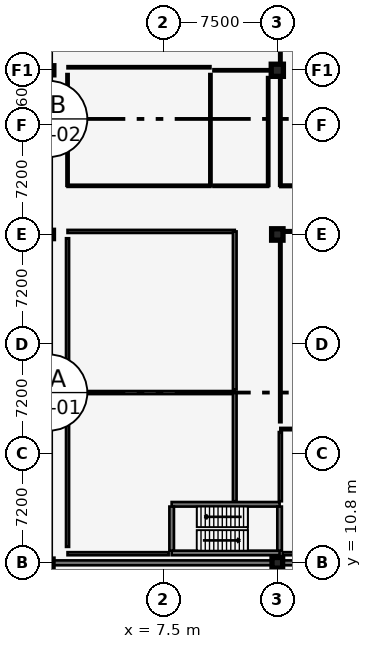
"""IFC4 building model, lengths in metres.
Left out: names, types, materials, properties, quantities, classifications, styles, units other than length and angle.
Written with IfcOpenShell. Run it as: python <this file> out.ifc"""

import sys

from ifc_helpers import new_model, si_unit, direction, frame, frame_2d, origin, origin_2d, place, context, subcontext, project, spatial, rectangle, extrude, element, fill, save


model = new_model("IFC4")
c1 = context("Model", 3, precision=1e-05, world=origin(), true_north=direction((0.0, 1.0)))
c2 = subcontext(c1, "Body", "Model", "MODEL_VIEW")
j1 = project(units=[si_unit("LENGTHUNIT", "METRE"), si_unit("PLANEANGLEUNIT", "RADIAN")], contexts=[c1])
p1 = place(None, origin())
s1 = spatial("IfcSite", under=j1, at=p1, CompositionType="ELEMENT")
p2 = place(p1, origin())
s2 = spatial("IfcBuilding", under=s1, at=p2, CompositionType="ELEMENT")
p3 = place(p2, origin())
s3 = spatial("IfcBuildingStorey", under=s2, at=p3, CompositionType="ELEMENT", Elevation=0.0)
p4 = place(p3, frame((0.0, 10.8, 0.0), z_axis=(0.0, 0.0, 1.0), x_axis=(1.0, 0.0, 0.0)))
e1 = element("IfcColumn", 1, at=p4, inside=s3, PredefinedType="COLUMN", context=c2, shape_type="SweptSolid", body=[
    extrude(rectangle(XDim=0.5, YDim=0.5, at=origin_2d()), origin(), (0.0, 0.0, 1.0), 4.8),
])
p5 = place(p3, frame((0.0, 32.4, 0.0), z_axis=(0.0, 0.0, 1.0), x_axis=(1.0, 0.0, 0.0)))
e2 = element("IfcColumn", 2, at=p5, inside=s3, PredefinedType="COLUMN", context=c2, shape_type="SweptSolid", body=[
    extrude(rectangle(XDim=0.55, YDim=0.55, at=origin_2d()), origin(), (0.0, 0.0, 1.0), 4.8),
])
p6 = place(p3, frame((0.0, 43.2, 0.0), z_axis=(0.0, 0.0, 1.0), x_axis=(1.0, 0.0, 0.0)))
e3 = element("IfcColumn", 3, at=p6, inside=s3, PredefinedType="COLUMN", context=c2, shape_type="SweptSolid", body=[
    extrude(rectangle(XDim=0.6, YDim=0.6, at=origin_2d()), origin(), (0.0, 0.0, 1.0), 4.8),
])
p7 = place(p3, frame((15.0, 10.8, 0.0), z_axis=(0.0, 0.0, 1.0), x_axis=(1.0, 0.0, 0.0)))
e4 = element("IfcColumn", 4, at=p7, inside=s3, PredefinedType="COLUMN", context=c2, shape_type="SweptSolid", body=[
    extrude(rectangle(XDim=0.7, YDim=0.7, at=origin_2d()), origin(), (0.0, 0.0, 1.0), 4.8),
])
p8 = place(p3, frame((15.0, 32.4, 0.0), z_axis=(0.0, 0.0, 1.0), x_axis=(1.0, 0.0, 0.0)))
e5 = element("IfcColumn", 5, at=p8, inside=s3, PredefinedType="COLUMN", context=c2, shape_type="SweptSolid", body=[
    extrude(rectangle(XDim=0.75, YDim=0.75, at=origin_2d()), origin(), (0.0, 0.0, 1.0), 4.8),
])
p9 = place(p3, frame((15.0, 43.2, 0.0), z_axis=(0.0, 0.0, 1.0), x_axis=(1.0, 0.0, 0.0)))
e6 = element("IfcColumn", 6, at=p9, inside=s3, PredefinedType="COLUMN", context=c2, shape_type="SweptSolid", body=[
    extrude(rectangle(XDim=0.8, YDim=0.8, at=origin_2d()), origin(), (0.0, 0.0, 1.0), 4.8),
])
p10 = place(p3, frame((0.0, 10.8, 0.0), z_axis=(0.0, 0.0, 1.0), x_axis=(1.0, 0.0, 0.0)))
e7 = element("IfcWall", 7, at=p10, inside=s3, PredefinedType="SOLIDWALL", context=c2, shape_type="SweptSolid", body=[
    extrude(rectangle(XDim=93.6, YDim=0.32, at=frame_2d((46.8, 0.0))), origin(), (0.0, 0.0, 1.0), 4.25),
])
p11 = place(p10, frame((2.2, 0.0, 0.72)))
e8 = element("IfcOpeningElement", 8, at=p11, cuts=e7, PredefinedType="OPENING", context=c2, shape_type="SweptSolid", body=[
    extrude(rectangle(XDim=1.35, YDim=2.05, at=frame_2d((0.675, 1.025))), frame((0.0, 0.17, 0.0), z_axis=(0.0, -1.0, 0.0), x_axis=(1.0, 0.0, 0.0)), (0.0, 0.0, 1.0), 0.34),
])
p12 = place(p10, frame((9.4, 0.0, 0.72)))
e9 = element("IfcOpeningElement", 9, at=p12, cuts=e7, PredefinedType="OPENING", context=c2, shape_type="SweptSolid", body=[
    extrude(rectangle(XDim=1.5, YDim=2.1, at=frame_2d((0.75, 1.05))), frame((0.0, 0.17, 0.0), z_axis=(0.0, -1.0, 0.0), x_axis=(1.0, 0.0, 0.0)), (0.0, 0.0, 1.0), 0.34),
])
p13 = place(p10, frame((16.6, 0.0, 0.72)))
e10 = element("IfcOpeningElement", 10, at=p13, cuts=e7, PredefinedType="OPENING", context=c2, shape_type="SweptSolid", body=[
    extrude(rectangle(XDim=1.65, YDim=2.1, at=frame_2d((0.825, 1.05))), frame((0.0, 0.17, 0.0), z_axis=(0.0, -1.0, 0.0), x_axis=(1.0, 0.0, 0.0)), (0.0, 0.0, 1.0), 0.34),
])
p14 = place(p10, frame((23.8, 0.0, 0.72)))
e11 = element("IfcOpeningElement", 11, at=p14, cuts=e7, PredefinedType="OPENING", context=c2, shape_type="SweptSolid", body=[
    extrude(rectangle(XDim=1.8, YDim=2.15, at=frame_2d((0.9, 1.075))), frame((0.0, 0.17, 0.0), z_axis=(0.0, -1.0, 0.0), x_axis=(1.0, 0.0, 0.0)), (0.0, 0.0, 1.0), 0.34),
])
p15 = place(p10, frame((31.0, 0.0, 0.72)))
e12 = element("IfcOpeningElement", 12, at=p15, cuts=e7, PredefinedType="OPENING", context=c2, shape_type="SweptSolid", body=[
    extrude(rectangle(XDim=1.2, YDim=2.0, at=frame_2d((0.6, 1.0))), frame((0.0, 0.17, 0.0), z_axis=(0.0, -1.0, 0.0), x_axis=(1.0, 0.0, 0.0)), (0.0, 0.0, 1.0), 0.34),
])
p16 = place(p10, frame((38.2, 0.0, 0.72)))
e13 = element("IfcOpeningElement", 13, at=p16, cuts=e7, PredefinedType="OPENING", context=c2, shape_type="SweptSolid", body=[
    extrude(rectangle(XDim=1.35, YDim=2.05, at=frame_2d((0.675, 1.025))), frame((0.0, 0.17, 0.0), z_axis=(0.0, -1.0, 0.0), x_axis=(1.0, 0.0, 0.0)), (0.0, 0.0, 1.0), 0.34),
])
p17 = place(p10, frame((52.6, 0.0, 0.72)))
e14 = element("IfcOpeningElement", 14, at=p17, cuts=e7, PredefinedType="OPENING", context=c2, shape_type="SweptSolid", body=[
    extrude(rectangle(XDim=1.65, YDim=2.1, at=frame_2d((0.825, 1.05))), frame((0.0, 0.17, 0.0), z_axis=(0.0, -1.0, 0.0), x_axis=(1.0, 0.0, 0.0)), (0.0, 0.0, 1.0), 0.34),
])
p18 = place(p10, frame((67.0, 0.0, 0.72)))
e15 = element("IfcOpeningElement", 15, at=p18, cuts=e7, PredefinedType="OPENING", context=c2, shape_type="SweptSolid", body=[
    extrude(rectangle(XDim=1.2, YDim=2.0, at=frame_2d((0.6, 1.0))), frame((0.0, 0.17, 0.0), z_axis=(0.0, -1.0, 0.0), x_axis=(1.0, 0.0, 0.0)), (0.0, 0.0, 1.0), 0.34),
])
p19 = place(p10, frame((81.4, 0.0, 0.72)))
e16 = element("IfcOpeningElement", 16, at=p19, cuts=e7, PredefinedType="OPENING", context=c2, shape_type="SweptSolid", body=[
    extrude(rectangle(XDim=1.5, YDim=2.1, at=frame_2d((0.75, 1.05))), frame((0.0, 0.17, 0.0), z_axis=(0.0, -1.0, 0.0), x_axis=(1.0, 0.0, 0.0)), (0.0, 0.0, 1.0), 0.34),
])
p20 = place(p10, frame((6.2, 0.0, 0.0)))
e17 = element("IfcOpeningElement", 17, at=p20, cuts=e7, PredefinedType="OPENING", context=c2, shape_type="SweptSolid", body=[
    extrude(rectangle(XDim=2.0, YDim=2.35, at=frame_2d((1.0, 1.175))), frame((0.0, 0.17, 0.0), z_axis=(0.0, -1.0, 0.0), x_axis=(1.0, 0.0, 0.0)), (0.0, 0.0, 1.0), 0.34),
])
p21 = place(p10, frame((20.6, 0.0, 0.0)))
e18 = element("IfcOpeningElement", 18, at=p21, cuts=e7, PredefinedType="OPENING", context=c2, shape_type="SweptSolid", body=[
    extrude(rectangle(XDim=1.05, YDim=2.1, at=frame_2d((0.525, 1.05))), frame((0.0, 0.17, 0.0), z_axis=(0.0, -1.0, 0.0), x_axis=(1.0, 0.0, 0.0)), (0.0, 0.0, 1.0), 0.34),
])
p22 = place(p10, frame((35.0, 0.0, 0.0)))
e19 = element("IfcOpeningElement", 19, at=p22, cuts=e7, PredefinedType="OPENING", context=c2, shape_type="SweptSolid", body=[
    extrude(rectangle(XDim=2.0, YDim=2.35, at=frame_2d((1.0, 1.175))), frame((0.0, 0.17, 0.0), z_axis=(0.0, -1.0, 0.0), x_axis=(1.0, 0.0, 0.0)), (0.0, 0.0, 1.0), 0.34),
])
p23 = place(p10, frame((49.4, 0.0, 0.0)))
e20 = element("IfcOpeningElement", 20, at=p23, cuts=e7, PredefinedType="OPENING", context=c2, shape_type="SweptSolid", body=[
    extrude(rectangle(XDim=2.0, YDim=2.35, at=frame_2d((1.0, 1.175))), frame((0.0, 0.17, 0.0), z_axis=(0.0, -1.0, 0.0), x_axis=(1.0, 0.0, 0.0)), (0.0, 0.0, 1.0), 0.34),
])
p24 = place(p10, frame((63.8, 0.0, 0.0)))
e21 = element("IfcOpeningElement", 21, at=p24, cuts=e7, PredefinedType="OPENING", context=c2, shape_type="SweptSolid", body=[
    extrude(rectangle(XDim=1.1, YDim=2.1, at=frame_2d((0.55, 1.05))), frame((0.0, 0.17, 0.0), z_axis=(0.0, -1.0, 0.0), x_axis=(1.0, 0.0, 0.0)), (0.0, 0.0, 1.0), 0.34),
])
for number, where, z_axis, x_axis in (
    (22, (8.05, 11.45, 0.0), (0.0, 0.0, 1.0), (1.0, 0.0, 0.0)),
    (23, (15.15, 14.65, 0.0), (0.0, 0.0, 1.0), (-1.0, 0.0, 0.0)),
):
    element("IfcWall", number, at=place(p3, frame(where, z_axis=z_axis, x_axis=x_axis)), inside=s3, PredefinedType="SHEAR", context=c2, shape_type="SweptSolid", body=[
        extrude(rectangle(XDim=7.1, YDim=0.3, at=frame_2d((3.55, 0.0))), origin(), (0.0, 0.0, 1.0), 4.5),
    ])
p25 = place(p3, frame((15.15, 11.6, 0.0), z_axis=(0.0, 0.0, 1.0), x_axis=(0.0, 1.0, 0.0)))
e24 = element("IfcWall", 24, at=p25, inside=s3, PredefinedType="SHEAR", context=c2, shape_type="SweptSolid", body=[
    extrude(rectangle(XDim=2.9, YDim=0.3, at=frame_2d((1.45, 0.0))), origin(), (0.0, 0.0, 1.0), 4.5),
])
p26 = place(p3, frame((8.05, 14.5, 0.0), z_axis=(0.0, 0.0, 1.0), x_axis=(0.0, -1.0, 0.0)))
e25 = element("IfcWall", 25, at=p26, inside=s3, PredefinedType="SHEAR", context=c2, shape_type="SweptSolid", body=[
    extrude(rectangle(XDim=2.9, YDim=0.3, at=frame_2d((1.45, 0.0))), origin(), (0.0, 0.0, 1.0), 4.5),
])
p27 = place(p26, frame((0.75, 0.0, 0.0)))
e26 = element("IfcOpeningElement", 26, at=p27, cuts=e25, PredefinedType="OPENING", context=c2, shape_type="SweptSolid", body=[
    extrude(rectangle(XDim=1.07, YDim=2.15, at=frame_2d((0.535, 1.075))), frame((0.0, 0.16, 0.0), z_axis=(0.0, -1.0, 0.0), x_axis=(1.0, 0.0, 0.0)), (0.0, 0.0, 1.0), 0.32),
])
p28 = place(p3, frame((55.8, 19.6, 0.0), z_axis=(0.0, 0.0, 1.0), x_axis=(-1.0, 0.0, 0.0)))
e27 = element("IfcWall", 27, at=p28, inside=s3, PredefinedType="PARTITIONING", context=c2, shape_type="SweptSolid", body=[
    extrude(rectangle(XDim=40.6, YDim=0.15, at=frame_2d((20.3, 0.0))), origin(), (0.0, 0.0, 1.0), 3.682),
])
p29 = place(p3, frame((15.2, 32.6, 0.0), z_axis=(0.0, 0.0, 1.0), x_axis=(0.0, -1.0, 0.0)))
e28 = element("IfcWall", 28, at=p29, inside=s3, PredefinedType="PARTITIONING", context=c2, shape_type="SweptSolid", body=[
    extrude(rectangle(XDim=12.55, YDim=0.15, at=frame_2d((6.275, 0.0))), origin(), (0.0, 0.0, 1.0), 4.1),
])
p30 = place(p3, frame((15.2, 32.6, 0.0), z_axis=(0.0, 0.0, 1.0), x_axis=(1.0, 0.0, 0.0)))
e29 = element("IfcWall", 29, at=p30, inside=s3, PredefinedType="PARTITIONING", context=c2, shape_type="SweptSolid", body=[
    extrude(rectangle(XDim=40.6, YDim=0.16, at=frame_2d((20.3, 0.0))), origin(), (0.0, 0.0, 1.0), 3.87),
])
p31 = place(p30, frame((19.3, 0.0, 0.0)))
e30 = element("IfcOpeningElement", 30, at=p31, cuts=e29, PredefinedType="OPENING", context=c2, shape_type="SweptSolid", body=[
    extrude(rectangle(XDim=2.0, YDim=2.3, at=frame_2d((1.0, 1.15))), frame((0.0, 0.09, 0.0), z_axis=(0.0, -1.0, 0.0), x_axis=(1.0, 0.0, 0.0)), (0.0, 0.0, 1.0), 0.18),
])
p32 = place(p30, frame((35.4, 0.0, 0.0)))
e31 = element("IfcOpeningElement", 31, at=p32, cuts=e29, PredefinedType="OPENING", context=c2, shape_type="SweptSolid", body=[
    extrude(rectangle(XDim=2.0, YDim=2.3, at=frame_2d((1.0, 1.15))), frame((0.0, 0.09, 0.0), z_axis=(0.0, -1.0, 0.0), x_axis=(1.0, 0.0, 0.0)), (0.0, 0.0, 1.0), 0.18),
])
p33 = place(p3, frame((15.2, 52.75, 0.0), z_axis=(0.0, 0.0, 1.0), x_axis=(0.0, -1.0, 0.0)))
e32 = element("IfcWall", 32, at=p33, inside=s3, PredefinedType="PARTITIONING", context=c2, shape_type="SweptSolid", body=[
    extrude(rectangle(XDim=17.15, YDim=0.15, at=frame_2d((8.575, 0.0))), origin(), (0.0, 0.0, 1.0), 4.025),
])
p34 = place(p3, frame((47.8, 35.6, 0.0), z_axis=(0.0, 0.0, 1.0), x_axis=(-1.0, 0.0, 0.0)))
e33 = element("IfcWall", 33, at=p34, inside=s3, PredefinedType="PARTITIONING", context=c2, shape_type="SweptSolid", body=[
    extrude(rectangle(XDim=32.6, YDim=0.16, at=frame_2d((16.3, 0.0))), origin(), (0.0, 0.0, 1.0), 4.025),
])
p35 = place(p34, frame((15.3, 0.0, 0.0)))
e34 = element("IfcOpeningElement", 34, at=p35, cuts=e33, PredefinedType="OPENING", context=c2, shape_type="SweptSolid", body=[
    extrude(rectangle(XDim=2.0, YDim=2.3, at=frame_2d((1.0, 1.15))), frame((0.0, 0.09, 0.0), z_axis=(0.0, -1.0, 0.0), x_axis=(1.0, 0.0, 0.0)), (0.0, 0.0, 1.0), 0.18),
])
p36 = place(p34, frame((27.4, 0.0, 0.0)))
e35 = element("IfcOpeningElement", 35, at=p36, cuts=e33, PredefinedType="OPENING", context=c2, shape_type="SweptSolid", body=[
    extrude(rectangle(XDim=2.0, YDim=2.3, at=frame_2d((1.0, 1.15))), frame((0.0, 0.09, 0.0), z_axis=(0.0, -1.0, 0.0), x_axis=(1.0, 0.0, 0.0)), (0.0, 0.0, 1.0), 0.18),
])
p37 = place(p3, frame((1.2, 22.0, 0.0), z_axis=(0.0, 0.0, 1.0), x_axis=(1.0, 0.0, 0.0)))
e36 = element("IfcWall", 36, at=p37, inside=s3, PredefinedType="SOLIDWALL", context=c2, shape_type="SweptSolid", body=[
    extrude(rectangle(XDim=11.0, YDim=0.2, at=frame_2d((5.5, 0.0))), origin(), (0.0, 0.0, 1.0), 4.1),
])
p38 = place(p3, frame((7.85, 11.4, 0.0), z_axis=(0.0, 0.0, 1.0), x_axis=(-1.0, 0.0, 0.0)))
e37 = element("IfcWall", 37, at=p38, inside=s3, PredefinedType="SOLIDWALL", context=c2, shape_type="SweptSolid", body=[
    extrude(rectangle(XDim=6.65, YDim=0.2, at=frame_2d((3.325, 0.0))), origin(), (0.0, 0.0, 1.0), 4.1),
])
p39 = place(p3, frame((1.2, 21.55, 0.0), z_axis=(0.0, 0.0, 1.0), x_axis=(0.0, -1.0, 0.0)))
e38 = element("IfcWall", 38, at=p39, inside=s3, PredefinedType="SOLIDWALL", context=c2, shape_type="SweptSolid", body=[
    extrude(rectangle(XDim=9.7, YDim=0.2, at=frame_2d((4.85, 0.0))), origin(), (0.0, 0.0, 1.0), 4.1),
])
p40 = place(p3, frame((12.2, 14.85, 0.0), z_axis=(0.0, 0.0, 1.0), x_axis=(0.0, 1.0, 0.0)))
e39 = element("IfcWall", 39, at=p40, inside=s3, PredefinedType="SOLIDWALL", context=c2, shape_type="SweptSolid", body=[
    extrude(rectangle(XDim=7.15, YDim=0.24, at=frame_2d((3.575, 0.0))), origin(), (0.0, 0.0, 1.0), 4.1),
])
p41 = place(p40, frame((2.775, 0.0, 0.0)))
e40 = element("IfcOpeningElement", 40, at=p41, cuts=e39, PredefinedType="OPENING", context=c2, shape_type="SweptSolid", body=[
    extrude(rectangle(XDim=1.6, YDim=2.15, at=frame_2d((0.8, 1.075))), frame((0.0, 0.13, 0.0), z_axis=(0.0, -1.0, 0.0), x_axis=(1.0, 0.0, 0.0)), (0.0, 0.0, 1.0), 0.26),
])
p42 = place(p3, frame((1.2, 32.6, 0.0), z_axis=(0.0, 0.0, 1.0), x_axis=(1.0, 0.0, 0.0)))
e41 = element("IfcWall", 41, at=p42, inside=s3, PredefinedType="SOLIDWALL", context=c2, shape_type="SweptSolid", body=[
    extrude(rectangle(XDim=11.0, YDim=0.2, at=frame_2d((5.5, 0.0))), origin(), (0.0, 0.0, 1.0), 3.87),
])
p43 = place(p3, frame((1.2, 32.15, 0.0), z_axis=(0.0, 0.0, 1.0), x_axis=(0.0, -1.0, 0.0)))
e42 = element("IfcWall", 42, at=p43, inside=s3, PredefinedType="SOLIDWALL", context=c2, shape_type="SweptSolid", body=[
    extrude(rectangle(XDim=9.7, YDim=0.2, at=frame_2d((4.85, 0.0))), origin(), (0.0, 0.0, 1.0), 4.1),
])
p44 = place(p3, frame((12.2, 22.2, 0.0), z_axis=(0.0, 0.0, 1.0), x_axis=(0.0, 1.0, 0.0)))
e43 = element("IfcWall", 43, at=p44, inside=s3, PredefinedType="SOLIDWALL", context=c2, shape_type="SweptSolid", body=[
    extrude(rectangle(XDim=10.4, YDim=0.24, at=frame_2d((5.2, 0.0))), origin(), (0.0, 0.0, 1.0), 3.87),
])
p45 = place(p44, frame((4.4, 0.0, 0.0)))
e44 = element("IfcOpeningElement", 44, at=p45, cuts=e43, PredefinedType="OPENING", context=c2, shape_type="SweptSolid", body=[
    extrude(rectangle(XDim=1.6, YDim=2.15, at=frame_2d((0.8, 1.075))), frame((0.0, 0.13, 0.0), z_axis=(0.0, -1.0, 0.0), x_axis=(1.0, 0.0, 0.0)), (0.0, 0.0, 1.0), 0.26),
])
p46 = place(p3, frame((38.0, 11.4, 0.0), z_axis=(0.0, 0.0, 1.0), x_axis=(-1.0, 0.0, 0.0)))
e45 = element("IfcWall", 45, at=p46, inside=s3, PredefinedType="SOLIDWALL", context=c2, shape_type="SweptSolid", body=[
    extrude(rectangle(XDim=22.65, YDim=0.2, at=frame_2d((11.325, 0.0))), origin(), (0.0, 0.0, 1.0), 3.682),
])
p47 = place(p3, frame((15.2, 19.4, 0.0), z_axis=(0.0, 0.0, 1.0), x_axis=(0.0, -1.0, 0.0)))
e46 = element("IfcWall", 46, at=p47, inside=s3, PredefinedType="SOLIDWALL", context=c2, shape_type="SweptSolid", body=[
    extrude(rectangle(XDim=4.55, YDim=0.2, at=frame_2d((2.275, 0.0))), origin(), (0.0, 0.0, 1.0), 4.1),
])
p48 = place(p47, frame((1.375, 0.0, 0.0)))
e47 = element("IfcOpeningElement", 47, at=p48, cuts=e46, PredefinedType="OPENING", context=c2, shape_type="SweptSolid", body=[
    extrude(rectangle(XDim=1.8, YDim=2.2, at=frame_2d((0.9, 1.1))), frame((0.0, 0.11, 0.0), z_axis=(0.0, -1.0, 0.0), x_axis=(1.0, 0.0, 0.0)), (0.0, 0.0, 1.0), 0.22),
])
p49 = place(p3, frame((1.2, 43.4, 0.0), z_axis=(0.0, 0.0, 1.0), x_axis=(1.0, 0.0, 0.0)))
e48 = element("IfcWall", 48, at=p49, inside=s3, PredefinedType="PARTITIONING", context=c2, shape_type="SweptSolid", body=[
    extrude(rectangle(XDim=9.4, YDim=0.14, at=frame_2d((4.7, 0.0))), origin(), (0.0, 0.0, 1.0), 3.8),
])
for number, where, z_axis, x_axis in (
    (49, (10.6, 35.6, 0.0), (0.0, 0.0, 1.0), (0.0, 1.0, 0.0)),
    (50, (1.2, 42.95, 0.0), (0.0, 0.0, 1.0), (0.0, -1.0, 0.0)),
):
    element("IfcWall", number, at=place(p3, frame(where, z_axis=z_axis, x_axis=x_axis)), inside=s3, PredefinedType="PARTITIONING", context=c2, shape_type="SweptSolid", body=[
        extrude(rectangle(XDim=7.35, YDim=0.14, at=frame_2d((3.675, 0.0))), origin(), (0.0, 0.0, 1.0), 3.8),
    ])
p50 = place(p3, frame((10.6, 35.6, 0.0), z_axis=(0.0, 0.0, 1.0), x_axis=(-1.0, 0.0, 0.0)))
e51 = element("IfcWall", 51, at=p50, inside=s3, PredefinedType="PARTITIONING", context=c2, shape_type="SweptSolid", body=[
    extrude(rectangle(XDim=9.4, YDim=0.14, at=frame_2d((4.7, 0.0))), origin(), (0.0, 0.0, 1.0), 3.8),
])
p51 = place(p50, frame((4.21, 0.0, 0.0)))
e52 = element("IfcOpeningElement", 52, at=p51, cuts=e51, PredefinedType="OPENING", context=c2, shape_type="SweptSolid", body=[
    extrude(rectangle(XDim=0.98, YDim=2.15, at=frame_2d((0.49, 1.075))), frame((0.0, 0.08, 0.0), z_axis=(0.0, -1.0, 0.0), x_axis=(1.0, 0.0, 0.0)), (0.0, 0.0, 1.0), 0.16),
])
p52 = place(p3, frame((10.8, 43.2, 0.0), z_axis=(0.0, 0.0, 1.0), x_axis=(1.0, 0.0, 0.0)))
e53 = element("IfcWall", 53, at=p52, inside=s3, PredefinedType="PARTITIONING", context=c2, shape_type="SweptSolid", body=[
    extrude(rectangle(XDim=3.6, YDim=0.14, at=frame_2d((1.8, 0.0))), origin(), (0.0, 0.0, 1.0), 3.8),
])
p53 = place(p3, frame((14.4, 35.6, 0.0), z_axis=(0.0, 0.0, 1.0), x_axis=(0.0, 1.0, 0.0)))
e54 = element("IfcWall", 54, at=p53, inside=s3, PredefinedType="PARTITIONING", context=c2, shape_type="SweptSolid", body=[
    extrude(rectangle(XDim=7.15, YDim=0.14, at=frame_2d((3.575, 0.0))), origin(), (0.0, 0.0, 1.0), 3.8),
])
p54 = place(p3, frame((14.4, 35.6, 0.0), z_axis=(0.0, 0.0, 1.0), x_axis=(-1.0, 0.0, 0.0)))
e55 = element("IfcWall", 55, at=p54, inside=s3, PredefinedType="PARTITIONING", context=c2, shape_type="SweptSolid", body=[
    extrude(rectangle(XDim=3.6, YDim=0.14, at=frame_2d((1.8, 0.0))), origin(), (0.0, 0.0, 1.0), 3.8),
])
p55 = place(p54, frame((1.305, 0.0, 0.0)))
e56 = element("IfcOpeningElement", 56, at=p55, cuts=e55, PredefinedType="OPENING", context=c2, shape_type="SweptSolid", body=[
    extrude(rectangle(XDim=0.99, YDim=2.15, at=frame_2d((0.495, 1.075))), frame((0.0, 0.08, 0.0), z_axis=(0.0, -1.0, 0.0), x_axis=(1.0, 0.0, 0.0)), (0.0, 0.0, 1.0), 0.16),
])
p56 = place(p11, origin())
e57 = element("IfcWindow", 57, at=p56, inside=s3, PartitioningType="SINGLE_PANEL", PredefinedType="WINDOW", context=c2, shape_type="SweptSolid", body=[
    extrude(rectangle(XDim=1.35, YDim=2.05, at=frame_2d((0.675, 1.025))), frame((0.0, 0.03, 0.0), z_axis=(0.0, -1.0, 0.0), x_axis=(1.0, 0.0, 0.0)), (0.0, 0.0, 1.0), 0.06),
])
fill(e8, e57)
p57 = place(p12, origin())
e58 = element("IfcWindow", 58, at=p57, inside=s3, PartitioningType="SINGLE_PANEL", PredefinedType="WINDOW", context=c2, shape_type="SweptSolid", body=[
    extrude(rectangle(XDim=1.5, YDim=2.1, at=frame_2d((0.75, 1.05))), frame((0.0, 0.03, 0.0), z_axis=(0.0, -1.0, 0.0), x_axis=(1.0, 0.0, 0.0)), (0.0, 0.0, 1.0), 0.06),
])
fill(e9, e58)
p58 = place(p20, frame((2.0, 0.0, 0.0), z_axis=(0.0, 0.0, 1.0), x_axis=(-1.0, 0.0, 0.0)))
e59 = element("IfcDoor", 59, at=p58, inside=s3, OperationType="DOUBLE_SWING_LEFT", PredefinedType="DOOR", context=c2, shape_type="SweptSolid", body=[
    extrude(rectangle(XDim=2.0, YDim=2.35, at=frame_2d((1.0, 1.175))), frame((0.0, 0.025, 0.0), z_axis=(0.0, -1.0, 0.0), x_axis=(1.0, 0.0, 0.0)), (0.0, 0.0, 1.0), 0.05),
])
fill(e17, e59)
p59 = place(p27, frame((1.07, 0.0, 0.0), z_axis=(0.0, 0.0, 1.0), x_axis=(-1.0, 0.0, 0.0)))
e60 = element("IfcDoor", 60, at=p59, inside=s3, OperationType="SINGLE_SWING_RIGHT", PredefinedType="DOOR", context=c2, shape_type="SweptSolid", body=[
    extrude(rectangle(XDim=1.07, YDim=2.15, at=frame_2d((0.535, 1.075))), frame((0.0, 0.025, 0.0), z_axis=(0.0, -1.0, 0.0), x_axis=(1.0, 0.0, 0.0)), (0.0, 0.0, 1.0), 0.05),
])
fill(e26, e60)
p60 = place(p41, origin())
e61 = element("IfcDoor", 61, at=p60, inside=s3, OperationType="DOUBLE_SWING_RIGHT", PredefinedType="DOOR", context=c2, shape_type="SweptSolid", body=[
    extrude(rectangle(XDim=1.6, YDim=2.15, at=frame_2d((0.8, 1.075))), frame((0.0, 0.025, 0.0), z_axis=(0.0, -1.0, 0.0), x_axis=(1.0, 0.0, 0.0)), (0.0, 0.0, 1.0), 0.05),
])
fill(e40, e61)
p61 = place(p45, origin())
e62 = element("IfcDoor", 62, at=p61, inside=s3, OperationType="DOUBLE_SWING_RIGHT", PredefinedType="DOOR", context=c2, shape_type="SweptSolid", body=[
    extrude(rectangle(XDim=1.6, YDim=2.15, at=frame_2d((0.8, 1.075))), frame((0.0, 0.025, 0.0), z_axis=(0.0, -1.0, 0.0), x_axis=(1.0, 0.0, 0.0)), (0.0, 0.0, 1.0), 0.05),
])
fill(e44, e62)
p62 = place(p48, origin())
e63 = element("IfcDoor", 63, at=p62, inside=s3, OperationType="DOUBLE_SWING_LEFT", PredefinedType="DOOR", context=c2, shape_type="SweptSolid", body=[
    extrude(rectangle(XDim=1.8, YDim=2.2, at=frame_2d((0.9, 1.1))), frame((0.0, 0.025, 0.0), z_axis=(0.0, -1.0, 0.0), x_axis=(1.0, 0.0, 0.0)), (0.0, 0.0, 1.0), 0.05),
])
fill(e47, e63)
p63 = place(p51, origin())
e64 = element("IfcDoor", 64, at=p63, inside=s3, OperationType="SINGLE_SWING_LEFT", PredefinedType="DOOR", context=c2, shape_type="SweptSolid", body=[
    extrude(rectangle(XDim=0.98, YDim=2.15, at=frame_2d((0.49, 1.075))), frame((0.0, 0.025, 0.0), z_axis=(0.0, -1.0, 0.0), x_axis=(1.0, 0.0, 0.0)), (0.0, 0.0, 1.0), 0.05),
])
fill(e52, e64)
p64 = place(p55, origin())
e65 = element("IfcDoor", 65, at=p64, inside=s3, OperationType="SINGLE_SWING_RIGHT", PredefinedType="DOOR", context=c2, shape_type="SweptSolid", body=[
    extrude(rectangle(XDim=0.99, YDim=2.15, at=frame_2d((0.495, 1.075))), frame((0.0, 0.025, 0.0), z_axis=(0.0, -1.0, 0.0), x_axis=(1.0, 0.0, 0.0)), (0.0, 0.0, 1.0), 0.05),
])
fill(e56, e65)
save(model, sys.argv[1])
